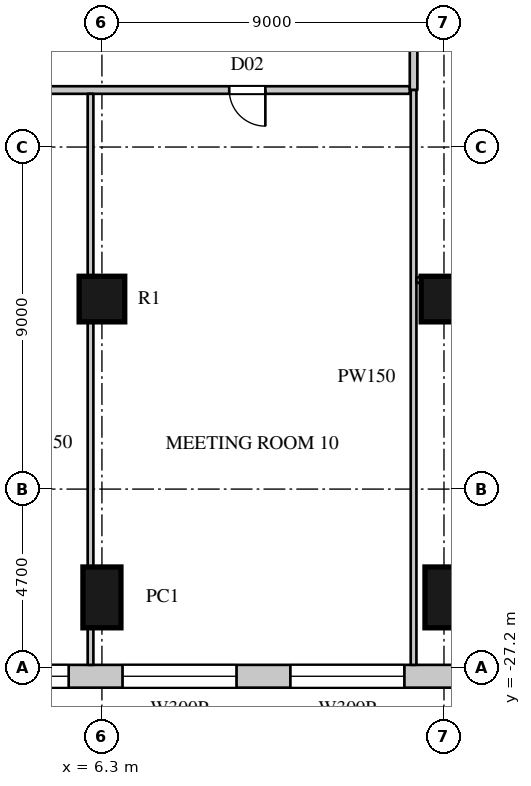
"""IFC4 building model, lengths in metres.
Left out: names, types, materials, properties, quantities, classifications, styles, units other than length and angle.
Written with IfcOpenShell. Run it as: python <this file> out.ifc"""

import sys

from ifc_helpers import new_model, si_unit, direction, frame, frame_2d, origin, origin_2d, place, context, subcontext, project, spatial, rectangle, circle, extrude, element, fill, save


model = new_model("IFC4")
c1 = context("Model", 3, precision=1e-05, world=origin(), true_north=direction((0.0, 1.0)))
c2 = subcontext(c1, "Body", "Model", "MODEL_VIEW")
j1 = project(units=[si_unit("LENGTHUNIT", "METRE"), si_unit("PLANEANGLEUNIT", "RADIAN")], contexts=[c1])
p1 = place(None, origin())
s1 = spatial("IfcSite", under=j1, at=p1, CompositionType="ELEMENT")
p2 = place(p1, origin())
s2 = spatial("IfcBuilding", under=s1, at=p2, CompositionType="ELEMENT")
p3 = place(p2, frame((0.0, 0.0, 44.0)))
s3 = spatial("IfcBuildingStorey", under=s2, at=p3, CompositionType="ELEMENT", Elevation=44.0)
for number, where, z_axis, x_axis in (
    (1, (6.3, -25.35, 0.0), (0.0, 0.0, 1.0), (1.0, 0.0, 0.0)),
    (2, (15.3, -25.35, 0.0), (0.0, 0.0, 1.0), (1.0, 0.0, 0.0)),
):
    element("IfcColumn", number, at=place(p3, frame(where, z_axis=z_axis, x_axis=x_axis)), inside=s3, PredefinedType="COLUMN", context=c2, shape_type="SweptSolid", body=[
        extrude(rectangle(XDim=1.0, YDim=1.6, at=origin_2d()), origin(), (0.0, 0.0, 1.0), 6.0),
    ])
for number, where, z_axis, x_axis in (
    (3, (6.3, -17.5, 0.0), (0.0, 0.0, 1.0), (1.0, 0.0, 0.0)),
    (4, (15.3, -17.5, 0.0), (0.0, 0.0, 1.0), (1.0, 0.0, 0.0)),
):
    element("IfcColumn", number, at=place(p3, frame(where, z_axis=z_axis, x_axis=x_axis)), inside=s3, PredefinedType="COLUMN", context=c2, shape_type="SweptSolid", body=[
        extrude(circle(Radius=0.6, at=origin_2d()), origin(), (0.0, 0.0, 1.0), 6.0),
    ])
p4 = place(p3, frame((-29.2, -27.425, 0.0), z_axis=(0.0, 0.0, 1.0), x_axis=(1.0, 0.0, 0.0)))
e5 = element("IfcWall", 5, at=p4, inside=s3, PredefinedType="ELEMENTEDWALL", context=c2, shape_type="SweptSolid", body=[
    extrude(rectangle(XDim=53.0, YDim=0.6, at=frame_2d((26.5, 0.0))), origin(), (0.0, 0.0, 1.0), 5.596),
])
p5 = place(p4, frame((5.125, 0.0, 1.2)))
e6 = element("IfcOpeningElement", 6, at=p5, cuts=e5, PredefinedType="OPENING", context=c2, shape_type="SweptSolid", body=[
    extrude(rectangle(XDim=3.0, YDim=2.4, at=frame_2d((1.5, 1.2))), frame((0.0, 0.31, 0.0), z_axis=(0.0, -1.0, 0.0), x_axis=(1.0, 0.0, 0.0)), (0.0, 0.0, 1.0), 0.62),
])
p6 = place(p4, frame((22.792, 0.0, 1.2)))
e7 = element("IfcOpeningElement", 7, at=p6, cuts=e5, PredefinedType="OPENING", context=c2, shape_type="SweptSolid", body=[
    extrude(rectangle(XDim=3.0, YDim=2.4, at=frame_2d((1.5, 1.2))), frame((0.0, 0.31, 0.0), z_axis=(0.0, -1.0, 0.0), x_axis=(1.0, 0.0, 0.0)), (0.0, 0.0, 1.0), 0.62),
])
p7 = place(p4, frame((27.208, 0.0, 1.2)))
e8 = element("IfcOpeningElement", 8, at=p7, cuts=e5, PredefinedType="OPENING", context=c2, shape_type="SweptSolid", body=[
    extrude(rectangle(XDim=3.0, YDim=2.4, at=frame_2d((1.5, 1.2))), frame((0.0, 0.31, 0.0), z_axis=(0.0, -1.0, 0.0), x_axis=(1.0, 0.0, 0.0)), (0.0, 0.0, 1.0), 0.62),
])
p8 = place(p4, frame((31.625, 0.0, 1.2)))
e9 = element("IfcOpeningElement", 9, at=p8, cuts=e5, PredefinedType="OPENING", context=c2, shape_type="SweptSolid", body=[
    extrude(rectangle(XDim=3.0, YDim=2.4, at=frame_2d((1.5, 1.2))), frame((0.0, 0.31, 0.0), z_axis=(0.0, -1.0, 0.0), x_axis=(1.0, 0.0, 0.0)), (0.0, 0.0, 1.0), 0.62),
])
p9 = place(p4, frame((36.042, 0.0, 1.2)))
e10 = element("IfcOpeningElement", 10, at=p9, cuts=e5, PredefinedType="OPENING", context=c2, shape_type="SweptSolid", body=[
    extrude(rectangle(XDim=3.0, YDim=2.4, at=frame_2d((1.5, 1.2))), frame((0.0, 0.31, 0.0), z_axis=(0.0, -1.0, 0.0), x_axis=(1.0, 0.0, 0.0)), (0.0, 0.0, 1.0), 0.62),
])
p10 = place(p4, frame((40.458, 0.0, 1.2)))
e11 = element("IfcOpeningElement", 11, at=p10, cuts=e5, PredefinedType="OPENING", context=c2, shape_type="SweptSolid", body=[
    extrude(rectangle(XDim=3.0, YDim=2.4, at=frame_2d((1.5, 1.2))), frame((0.0, 0.31, 0.0), z_axis=(0.0, -1.0, 0.0), x_axis=(1.0, 0.0, 0.0)), (0.0, 0.0, 1.0), 0.62),
])
p11 = place(p4, frame((44.875, 0.0, 1.2)))
e12 = element("IfcOpeningElement", 12, at=p11, cuts=e5, PredefinedType="OPENING", context=c2, shape_type="SweptSolid", body=[
    extrude(rectangle(XDim=3.0, YDim=2.4, at=frame_2d((1.5, 1.2))), frame((0.0, 0.31, 0.0), z_axis=(0.0, -1.0, 0.0), x_axis=(1.0, 0.0, 0.0)), (0.0, 0.0, 1.0), 0.62),
])
p12 = place(p4, frame((49.292, 0.0, 1.2)))
e13 = element("IfcOpeningElement", 13, at=p12, cuts=e5, PredefinedType="OPENING", context=c2, shape_type="SweptSolid", body=[
    extrude(rectangle(XDim=3.0, YDim=2.4, at=frame_2d((1.5, 1.2))), frame((0.0, 0.31, 0.0), z_axis=(0.0, -1.0, 0.0), x_axis=(1.0, 0.0, 0.0)), (0.0, 0.0, 1.0), 0.62),
])
p13 = place(p4, frame((0.754, 0.0, 1.2)))
e14 = element("IfcOpeningElement", 14, at=p13, cuts=e5, PredefinedType="OPENING", context=c2, shape_type="SweptSolid", body=[
    extrude(rectangle(XDim=2.1, YDim=2.4, at=frame_2d((1.05, 1.2))), frame((0.0, 0.31, 0.0), z_axis=(0.0, -1.0, 0.0), x_axis=(1.0, 0.0, 0.0)), (0.0, 0.0, 1.0), 0.62),
])
p14 = place(p4, frame((9.671, 0.0, 1.2)))
e15 = element("IfcOpeningElement", 15, at=p14, cuts=e5, PredefinedType="OPENING", context=c2, shape_type="SweptSolid", body=[
    extrude(rectangle(XDim=0.6, YDim=2.4, at=frame_2d((0.3, 1.2))), frame((0.0, 0.31, 0.0), z_axis=(0.0, -1.0, 0.0), x_axis=(1.0, 0.0, 0.0)), (0.0, 0.0, 1.0), 0.62),
])
p15 = place(p4, frame((11.021, 0.0, 1.2)))
e16 = element("IfcOpeningElement", 16, at=p15, cuts=e5, PredefinedType="OPENING", context=c2, shape_type="SweptSolid", body=[
    extrude(rectangle(XDim=1.5, YDim=2.4, at=frame_2d((0.75, 1.2))), frame((0.0, 0.31, 0.0), z_axis=(0.0, -1.0, 0.0), x_axis=(1.0, 0.0, 0.0)), (0.0, 0.0, 1.0), 0.62),
])
p16 = place(p4, frame((14.029, 0.0, 1.2)))
e17 = element("IfcOpeningElement", 17, at=p16, cuts=e5, PredefinedType="OPENING", context=c2, shape_type="SweptSolid", body=[
    extrude(rectangle(XDim=1.8, YDim=2.4, at=frame_2d((0.9, 1.2))), frame((0.0, 0.31, 0.0), z_axis=(0.0, -1.0, 0.0), x_axis=(1.0, 0.0, 0.0)), (0.0, 0.0, 1.0), 0.62),
])
p17 = place(p4, frame((19.137, 0.0, 1.2)))
e18 = element("IfcOpeningElement", 18, at=p17, cuts=e5, PredefinedType="OPENING", context=c2, shape_type="SweptSolid", body=[
    extrude(rectangle(XDim=2.1, YDim=2.4, at=frame_2d((1.05, 1.2))), frame((0.0, 0.31, 0.0), z_axis=(0.0, -1.0, 0.0), x_axis=(1.0, 0.0, 0.0)), (0.0, 0.0, 1.0), 0.62),
])
p18 = place(p3, frame((-10.4, -12.0, 0.0), z_axis=(0.0, 0.0, 1.0), x_axis=(1.0, 0.0, 0.0)))
e19 = element("IfcWall", 19, at=p18, inside=s3, PredefinedType="PARTITIONING", context=c2, shape_type="SweptSolid", body=[
    extrude(rectangle(XDim=24.8, YDim=0.2, at=frame_2d((12.4, 0.0))), origin(), (0.0, 0.0, 1.0), 5.596),
])
p19 = place(p18, frame((3.3, 0.0, 0.0)))
e20 = element("IfcOpeningElement", 20, at=p19, cuts=e19, PredefinedType="OPENING", context=c2, shape_type="SweptSolid", body=[
    extrude(rectangle(XDim=0.95, YDim=2.2, at=frame_2d((0.475, 1.1))), frame((0.0, 0.11, 0.0), z_axis=(0.0, -1.0, 0.0), x_axis=(1.0, 0.0, 0.0)), (0.0, 0.0, 1.0), 0.22),
])
p20 = place(p18, frame((11.4, 0.0, 0.0)))
e21 = element("IfcOpeningElement", 21, at=p20, cuts=e19, PredefinedType="OPENING", context=c2, shape_type="SweptSolid", body=[
    extrude(rectangle(XDim=0.95, YDim=2.2, at=frame_2d((0.475, 1.1))), frame((0.0, 0.11, 0.0), z_axis=(0.0, -1.0, 0.0), x_axis=(1.0, 0.0, 0.0)), (0.0, 0.0, 1.0), 0.22),
])
p21 = place(p18, frame((20.05, 0.0, 0.0)))
e22 = element("IfcOpeningElement", 22, at=p21, cuts=e19, PredefinedType="OPENING", context=c2, shape_type="SweptSolid", body=[
    extrude(rectangle(XDim=0.95, YDim=2.2, at=frame_2d((0.475, 1.1))), frame((0.0, 0.11, 0.0), z_axis=(0.0, -1.0, 0.0), x_axis=(1.0, 0.0, 0.0)), (0.0, 0.0, 1.0), 0.22),
])
p22 = place(p3, frame((14.5, -12.0, 0.0), z_axis=(0.0, 0.0, 1.0), x_axis=(0.0, 1.0, 0.0)))
e23 = element("IfcWall", 23, at=p22, inside=s3, PredefinedType="PARTITIONING", context=c2, shape_type="SweptSolid", body=[
    extrude(rectangle(XDim=3.9, YDim=0.2, at=frame_2d((1.95, 0.0))), origin(), (0.0, 0.0, 1.0), 5.596),
])
p23 = place(p22, frame((1.15, 0.0, 0.0)))
e24 = element("IfcOpeningElement", 24, at=p23, cuts=e23, PredefinedType="OPENING", context=c2, shape_type="SweptSolid", body=[
    extrude(rectangle(XDim=1.6, YDim=2.4, at=frame_2d((0.8, 1.2))), frame((0.0, 0.11, 0.0), z_axis=(0.0, -1.0, 0.0), x_axis=(1.0, 0.0, 0.0)), (0.0, 0.0, 1.0), 0.22),
])
p24 = place(p3, frame((6.0, -27.125, 0.0), z_axis=(0.0, 0.0, 1.0), x_axis=(0.0, 1.0, 0.0)))
e25 = element("IfcWall", 25, at=p24, inside=s3, PredefinedType="PARTITIONING", context=c2, shape_type="SweptSolid", body=[
    extrude(rectangle(XDim=0.975, YDim=0.15, at=frame_2d((0.488, 0.0))), origin(), (0.0, 0.0, 1.0), 5.596),
])
p25 = place(p3, frame((6.0, -24.55, 0.0), z_axis=(0.0, 0.0, 1.0), x_axis=(0.0, 1.0, 0.0)))
e26 = element("IfcWall", 26, at=p25, inside=s3, PredefinedType="PARTITIONING", context=c2, shape_type="SweptSolid", body=[
    extrude(rectangle(XDim=6.503, YDim=0.15, at=frame_2d((3.252, 0.0))), origin(), (0.0, 0.0, 1.0), 5.596),
])
p26 = place(p3, frame((6.0, -16.953, 0.0), z_axis=(0.0, 0.0, 1.0), x_axis=(0.0, 1.0, 0.0)))
e27 = element("IfcWall", 27, at=p26, inside=s3, PredefinedType="PARTITIONING", context=c2, shape_type="SweptSolid", body=[
    extrude(rectangle(XDim=4.853, YDim=0.15, at=frame_2d((2.427, 0.0))), origin(), (0.0, 0.0, 1.0), 5.596),
])
p27 = place(p3, frame((14.5, -27.125, 0.0), z_axis=(0.0, 0.0, 1.0), x_axis=(0.0, 1.0, 0.0)))
e28 = element("IfcWall", 28, at=p27, inside=s3, PredefinedType="PARTITIONING", context=c2, shape_type="SweptSolid", body=[
    extrude(rectangle(XDim=15.125, YDim=0.15, at=frame_2d((7.562, 0.0))), origin(), (0.0, 0.0, 1.0), 5.596),
])
p28 = place(p3, frame((14.575, -17.0, 0.0), z_axis=(0.0, 0.0, 1.0), x_axis=(1.0, 0.0, 0.0)))
e29 = element("IfcWall", 29, at=p28, inside=s3, PredefinedType="PARTITIONING", context=c2, shape_type="SweptSolid", body=[
    extrude(rectangle(XDim=0.314, YDim=0.15, at=frame_2d((0.157, 0.0))), origin(), (0.0, 0.0, 1.0), 5.596),
])
p29 = place(p8, origin())
e30 = element("IfcWindow", 30, at=p29, inside=s3, PartitioningType="SINGLE_PANEL", PredefinedType="WINDOW", context=c2, shape_type="SweptSolid", body=[
    extrude(rectangle(XDim=3.0, YDim=2.4, at=frame_2d((1.5, 1.2))), frame((0.0, 0.06, 0.0), z_axis=(0.0, -1.0, 0.0), x_axis=(1.0, 0.0, 0.0)), (0.0, 0.0, 1.0), 0.06),
])
fill(e9, e30)
p30 = place(p9, origin())
e31 = element("IfcWindow", 31, at=p30, inside=s3, PartitioningType="SINGLE_PANEL", PredefinedType="WINDOW", context=c2, shape_type="SweptSolid", body=[
    extrude(rectangle(XDim=3.0, YDim=2.4, at=frame_2d((1.5, 1.2))), frame((0.0, 0.06, 0.0), z_axis=(0.0, -1.0, 0.0), x_axis=(1.0, 0.0, 0.0)), (0.0, 0.0, 1.0), 0.06),
])
fill(e10, e31)
p31 = place(p10, origin())
e32 = element("IfcWindow", 32, at=p31, inside=s3, PartitioningType="SINGLE_PANEL", PredefinedType="WINDOW", context=c2, shape_type="SweptSolid", body=[
    extrude(rectangle(XDim=3.0, YDim=2.4, at=frame_2d((1.5, 1.2))), frame((0.0, 0.06, 0.0), z_axis=(0.0, -1.0, 0.0), x_axis=(1.0, 0.0, 0.0)), (0.0, 0.0, 1.0), 0.06),
])
fill(e11, e32)
p32 = place(p21, origin())
e33 = element("IfcDoor", 33, at=p32, inside=s3, OperationType="SINGLE_SWING_LEFT", PredefinedType="DOOR", context=c2, shape_type="SweptSolid", body=[
    extrude(rectangle(XDim=0.95, YDim=2.2, at=frame_2d((0.475, 1.1))), frame((0.0, 0.025, 0.0), z_axis=(0.0, -1.0, 0.0), x_axis=(1.0, 0.0, 0.0)), (0.0, 0.0, 1.0), 0.05),
])
fill(e22, e33)
save(model, sys.argv[1])
